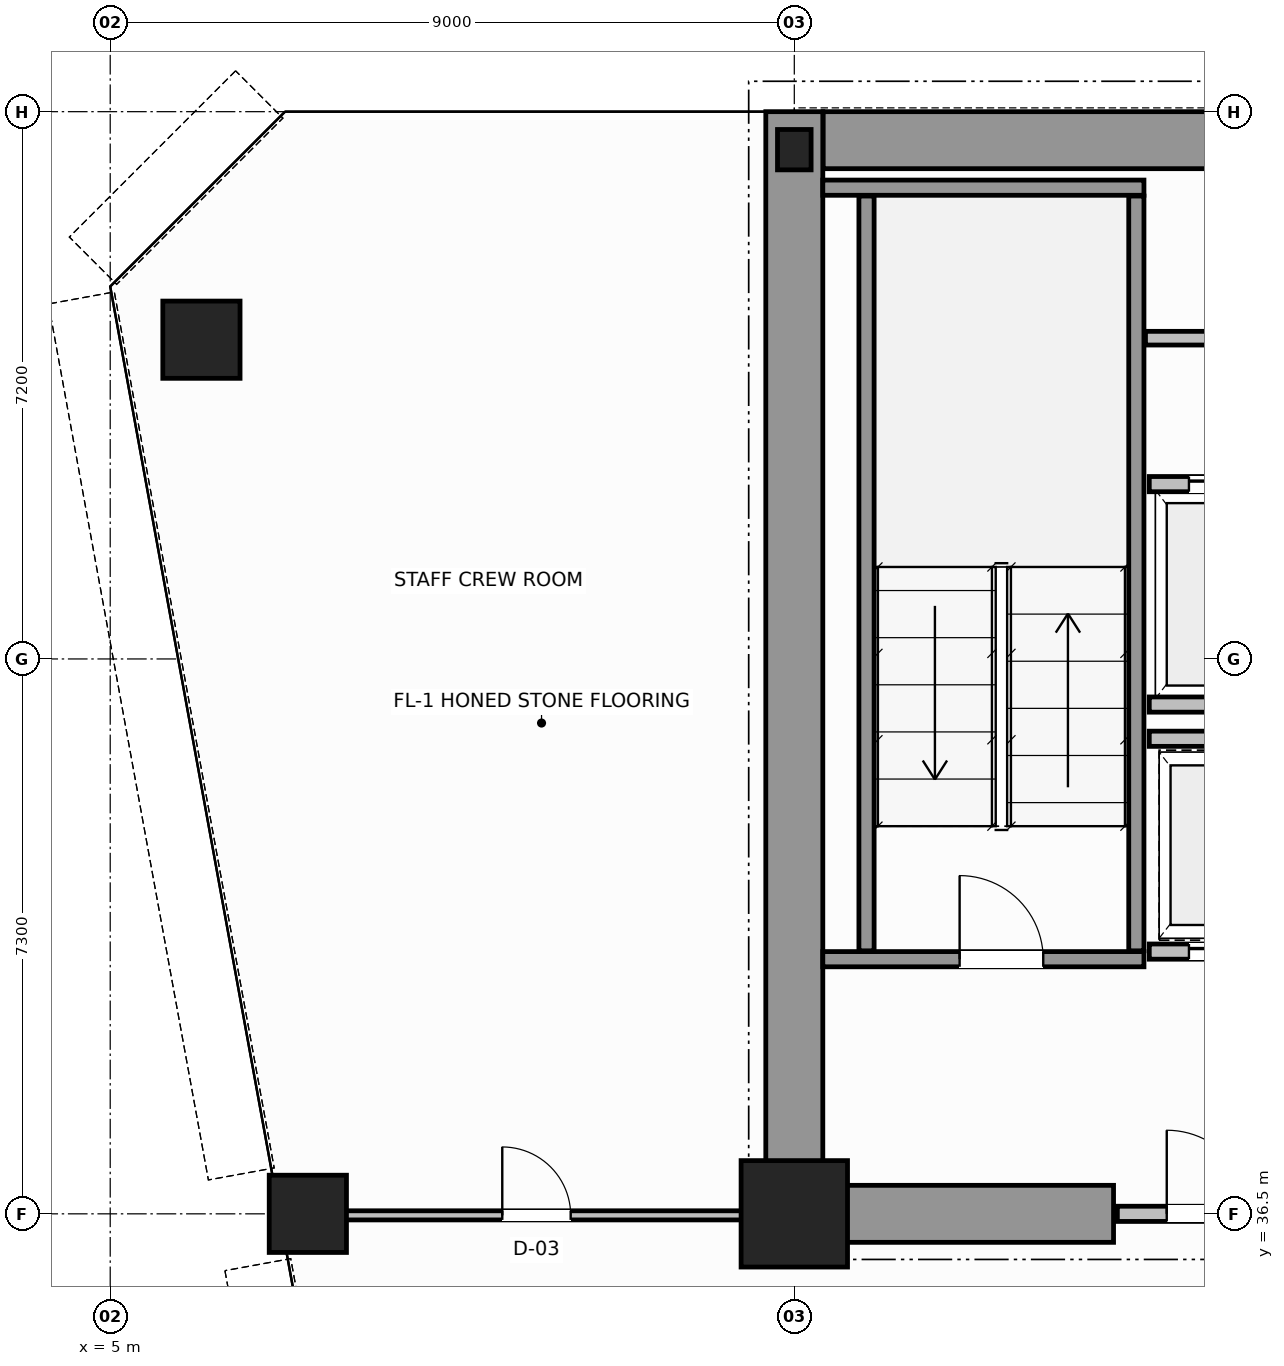
"""IFC4 building model, lengths in metres.
Left out: names, types, materials, properties, quantities, classifications, styles, units other than length and angle.
Written with IfcOpenShell. Run it as: python <this file> out.ifc"""

import sys

from ifc_helpers import new_model, si_unit, direction, frame, frame_2d, origin, origin_2d, place, context, subcontext, project, spatial, rectangle, hollow_circle, i_section, extrude, source, transform, mapped, element, fill, save


model = new_model("IFC4")
c1 = context("Model", 3, precision=1e-05, world=origin(), true_north=direction((0.0, 1.0)))
c2 = subcontext(c1, "Body", "Model", "MODEL_VIEW")
j1 = project(units=[si_unit("LENGTHUNIT", "METRE"), si_unit("PLANEANGLEUNIT", "RADIAN")], contexts=[c1])
p1 = place(None, origin())
s1 = spatial("IfcSite", under=j1, at=p1, CompositionType="ELEMENT")
p2 = place(p1, origin())
s2 = spatial("IfcBuilding", under=s1, at=p2, CompositionType="ELEMENT")
p3 = place(p2, frame((0.0, 0.0, 95.8)))
s3 = spatial("IfcBuildingStorey", under=s2, at=p3, CompositionType="ELEMENT", Elevation=95.8)
m1 = source(origin(), c2, "Body", "SweptSolid", [
    extrude(rectangle(XDim=1.4, YDim=1.4, at=origin_2d()), origin(), (0.0, 0.0, 1.0), 3.8),
])
p4 = place(p3, frame((14.0, 36.5, 0.0), z_axis=(0.0, 0.0, 1.0), x_axis=(1.0, 0.0, 0.0)))
e1 = element("IfcColumn", 1, at=p4, inside=s3, PredefinedType="COLUMN", context=c2, shape_type="MappedRepresentation", body=[
    mapped(m1, transform((0.0, 0.0, 0.0), scale=1.0)),
])
m2 = source(origin(), c2, "Body", "SweptSolid", [
    extrude(i_section(OverallWidth=0.442, OverallDepth=0.531, WebThickness=0.065, FlangeThickness=0.076, FilletRadius=0.015, at=origin_2d()), origin(), (0.0, 0.0, 1.0), 3.8),
])
p5 = place(p3, frame((14.0, 50.5, 0.0), z_axis=(0.0, 0.0, 1.0), x_axis=(1.0, 0.0, 0.0)))
e2 = element("IfcColumn", 2, at=p5, inside=s3, PredefinedType="COLUMN", context=c2, shape_type="MappedRepresentation", body=[
    mapped(m2, transform((0.0, 0.0, 0.0), scale=1.0)),
])
m3 = source(origin(), c2, "Body", "SweptSolid", [
    extrude(hollow_circle(Radius=0.508, WallThickness=0.045, at=origin_2d()), origin(), (0.0, 0.0, 1.0), 3.8),
])
for number, where, z_axis, x_axis in (
    (3, (6.2, 48.0, 0.0), (0.0, 0.0, 1.0), (1.0, 0.0, 0.0)),
    (4, (7.6, 36.5, 0.0), (0.0, 0.0, 1.0), (1.0, 0.0, 0.0)),
):
    element("IfcColumn", number, at=place(p3, frame(where, z_axis=z_axis, x_axis=x_axis)), inside=s3, PredefinedType="COLUMN", context=c2, shape_type="MappedRepresentation", body=[
        mapped(m3, transform((0.0, 0.0, 0.0), scale=1.0)),
    ])
p6 = place(p3, frame((14.379, 50.625, 0.0), z_axis=(0.0, 0.0, 1.0), x_axis=(1.0, 0.0, 0.0)))
e5 = element("IfcWall", 5, at=p6, inside=s3, PredefinedType="SHEAR", context=c2, shape_type="SweptSolid", body=[
    extrude(rectangle(XDim=19.619, YDim=0.75, at=frame_2d((9.81, 0.0))), origin(), (0.0, 0.0, 1.0), 3.8),
])
p7 = place(p3, frame((14.0, 36.5, 0.0), z_axis=(0.0, 0.0, 1.0), x_axis=(0.0, 1.0, 0.0)))
e6 = element("IfcWall", 6, at=p7, inside=s3, PredefinedType="SHEAR", context=c2, shape_type="SweptSolid", body=[
    extrude(rectangle(XDim=14.5, YDim=0.75, at=frame_2d((7.25, 0.0))), origin(), (0.0, 0.0, 1.0), 3.8),
])
p8 = place(p3, frame((14.395, 36.5, 0.0), z_axis=(0.0, 0.0, 1.0), x_axis=(1.0, 0.0, 0.0)))
e7 = element("IfcWall", 7, at=p8, inside=s3, PredefinedType="SHEAR", context=c2, shape_type="SweptSolid", body=[
    extrude(rectangle(XDim=3.805, YDim=0.75, at=frame_2d((1.902, 0.0))), origin(), (0.0, 0.0, 1.0), 2.38),
])
p9 = place(p3, frame((14.375, 39.85, 0.0), z_axis=(0.0, 0.0, 1.0), x_axis=(1.0, 0.0, 0.0)))
e8 = element("IfcWall", 8, at=p9, inside=s3, PredefinedType="SOLIDWALL", context=c2, shape_type="SweptSolid", body=[
    extrude(rectangle(XDim=4.225, YDim=0.2, at=frame_2d((2.113, 0.0))), origin(), (0.0, 0.0, 1.0), 3.8),
])
p10 = place(p9, frame((1.8, 0.0, 0.0)))
e9 = element("IfcOpeningElement", 9, at=p10, cuts=e8, PredefinedType="OPENING", context=c2, shape_type="SweptSolid", body=[
    extrude(rectangle(XDim=1.1, YDim=2.15, at=frame_2d((0.55, 1.075))), frame((0.0, 0.11, 0.0), z_axis=(0.0, -1.0, 0.0), x_axis=(1.0, 0.0, 0.0)), (0.0, 0.0, 1.0), 0.22),
])
p11 = place(p3, frame((14.375, 50.0, 0.0), z_axis=(0.0, 0.0, 1.0), x_axis=(1.0, 0.0, 0.0)))
e10 = element("IfcWall", 10, at=p11, inside=s3, PredefinedType="SOLIDWALL", context=c2, shape_type="SweptSolid", body=[
    extrude(rectangle(XDim=4.225, YDim=0.2, at=frame_2d((2.113, 0.0))), origin(), (0.0, 0.0, 1.0), 3.8),
])
for number, where, z_axis, x_axis in (
    (11, (14.95, 39.96, 0.0), (0.0, 0.0, 1.0), (0.0, 1.0, 0.0)),
    (12, (18.5, 39.96, 0.0), (0.0, 0.0, 1.0), (0.0, 1.0, 0.0)),
):
    element("IfcWall", number, at=place(p3, frame(where, z_axis=z_axis, x_axis=x_axis)), inside=s3, PredefinedType="SOLIDWALL", context=c2, shape_type="SweptSolid", body=[
        extrude(rectangle(XDim=9.93, YDim=0.2, at=frame_2d((4.965, 0.0))), origin(), (0.0, 0.0, 1.0), 3.8),
    ])
p12 = place(p3, frame((18.25, 36.5, 0.0), z_axis=(0.0, 0.0, 1.0), x_axis=(1.0, 0.0, 0.0)))
e13 = element("IfcWall", 13, at=p12, inside=s3, PredefinedType="SOLIDWALL", context=c2, shape_type="SweptSolid", body=[
    extrude(rectangle(XDim=2.47, YDim=0.2, at=frame_2d((1.235, 0.0))), origin(), (0.0, 0.0, 1.0), 2.37),
])
p13 = place(p12, frame((0.65, 0.0, 0.0)))
e14 = element("IfcOpeningElement", 14, at=p13, cuts=e13, PredefinedType="OPENING", context=c2, shape_type="SweptSolid", body=[
    extrude(rectangle(XDim=1.1, YDim=2.15, at=frame_2d((0.55, 1.075))), frame((0.0, 0.11, 0.0), z_axis=(0.0, -1.0, 0.0), x_axis=(1.0, 0.0, 0.0)), (0.0, 0.0, 1.0), 0.22),
])
p14 = place(p3, frame((18.67, 46.1, 0.0), z_axis=(0.0, 0.0, 1.0), x_axis=(1.0, 0.0, 0.0)))
e15 = element("IfcWall", 15, at=p14, inside=s3, PredefinedType="SOLIDWALL", context=c2, shape_type="SweptSolid", body=[
    extrude(rectangle(XDim=2.145, YDim=0.2, at=frame_2d((1.073, 0.0))), origin(), (0.0, 0.0, 1.0), 3.58),
])
p15 = place(p14, frame((0.522, 0.0, 0.0)))
e16 = element("IfcOpeningElement", 16, at=p15, cuts=e15, PredefinedType="OPENING", context=c2, shape_type="SweptSolid", body=[
    extrude(rectangle(XDim=1.1, YDim=2.15, at=frame_2d((0.55, 1.075))), frame((0.0, 0.11, 0.0), z_axis=(0.0, -1.0, 0.0), x_axis=(1.0, 0.0, 0.0)), (0.0, 0.0, 1.0), 0.22),
])
p16 = place(p3, frame((18.67, 43.2, 0.0), z_axis=(0.0, 0.0, 1.0), x_axis=(1.0, 0.0, 0.0)))
e17 = element("IfcWall", 17, at=p16, inside=s3, PredefinedType="SOLIDWALL", context=c2, shape_type="SweptSolid", body=[
    extrude(rectangle(XDim=2.145, YDim=0.2, at=frame_2d((1.073, 0.0))), origin(), (0.0, 0.0, 1.0), 3.58),
])
p17 = place(p3, frame((18.67, 39.95, 0.0), z_axis=(0.0, 0.0, 1.0), x_axis=(1.0, 0.0, 0.0)))
e18 = element("IfcWall", 18, at=p17, inside=s3, PredefinedType="SOLIDWALL", context=c2, shape_type="SweptSolid", body=[
    extrude(rectangle(XDim=2.145, YDim=0.2, at=frame_2d((1.073, 0.0))), origin(), (0.0, 0.0, 1.0), 3.58),
])
p18 = place(p17, frame((0.522, 0.0, 0.0)))
e19 = element("IfcOpeningElement", 19, at=p18, cuts=e18, PredefinedType="OPENING", context=c2, shape_type="SweptSolid", body=[
    extrude(rectangle(XDim=1.1, YDim=2.15, at=frame_2d((0.55, 1.075))), frame((0.0, 0.11, 0.0), z_axis=(0.0, -1.0, 0.0), x_axis=(1.0, 0.0, 0.0)), (0.0, 0.0, 1.0), 0.22),
])
p19 = place(p3, frame((18.67, 42.75, 0.0), z_axis=(0.0, 0.0, 1.0), x_axis=(1.0, 0.0, 0.0)))
e20 = element("IfcWall", 20, at=p19, inside=s3, PredefinedType="SOLIDWALL", context=c2, shape_type="SweptSolid", body=[
    extrude(rectangle(XDim=2.145, YDim=0.2, at=frame_2d((1.073, 0.0))), origin(), (0.0, 0.0, 1.0), 3.58),
])
p20 = place(p3, frame((18.62, 48.02, 0.0), z_axis=(0.0, 0.0, 1.0), x_axis=(1.0, 0.0, 0.0)))
e21 = element("IfcWall", 21, at=p20, inside=s3, PredefinedType="PLUMBINGWALL", context=c2, shape_type="SweptSolid", body=[
    extrude(rectangle(XDim=30.76, YDim=0.18, at=frame_2d((15.38, 0.0))), origin(), (0.0, 0.0, 1.0), 3.58),
])
p21 = place(p20, frame((1.655, 0.0, 0.0)))
e22 = element("IfcOpeningElement", 22, at=p21, cuts=e21, PredefinedType="OPENING", context=c2, shape_type="SweptSolid", body=[
    extrude(rectangle(XDim=0.9, YDim=2.15, at=frame_2d((0.45, 1.075))), frame((0.0, 0.1, 0.0), z_axis=(0.0, -1.0, 0.0), x_axis=(1.0, 0.0, 0.0)), (0.0, 0.0, 1.0), 0.2),
])
p22 = place(p20, frame((6.03, 0.0, 0.0)))
e23 = element("IfcOpeningElement", 23, at=p22, cuts=e21, PredefinedType="OPENING", context=c2, shape_type="SweptSolid", body=[
    extrude(rectangle(XDim=0.9, YDim=2.15, at=frame_2d((0.45, 1.075))), frame((0.0, 0.1, 0.0), z_axis=(0.0, -1.0, 0.0), x_axis=(1.0, 0.0, 0.0)), (0.0, 0.0, 1.0), 0.2),
])
p23 = place(p20, frame((10.93, 0.0, 0.0)))
e24 = element("IfcOpeningElement", 24, at=p23, cuts=e21, PredefinedType="OPENING", context=c2, shape_type="SweptSolid", body=[
    extrude(rectangle(XDim=0.9, YDim=2.15, at=frame_2d((0.45, 1.075))), frame((0.0, 0.1, 0.0), z_axis=(0.0, -1.0, 0.0), x_axis=(1.0, 0.0, 0.0)), (0.0, 0.0, 1.0), 0.2),
])
p24 = place(p20, frame((16.13, 0.0, 0.0)))
e25 = element("IfcOpeningElement", 25, at=p24, cuts=e21, PredefinedType="OPENING", context=c2, shape_type="SweptSolid", body=[
    extrude(rectangle(XDim=0.9, YDim=2.15, at=frame_2d((0.45, 1.075))), frame((0.0, 0.1, 0.0), z_axis=(0.0, -1.0, 0.0), x_axis=(1.0, 0.0, 0.0)), (0.0, 0.0, 1.0), 0.2),
])
p25 = place(p20, frame((21.73, 0.0, 0.0)))
e26 = element("IfcOpeningElement", 26, at=p25, cuts=e21, PredefinedType="OPENING", context=c2, shape_type="SweptSolid", body=[
    extrude(rectangle(XDim=0.9, YDim=2.15, at=frame_2d((0.45, 1.075))), frame((0.0, 0.1, 0.0), z_axis=(0.0, -1.0, 0.0), x_axis=(1.0, 0.0, 0.0)), (0.0, 0.0, 1.0), 0.2),
])
p26 = place(p20, frame((27.505, 0.0, 0.0)))
e27 = element("IfcOpeningElement", 27, at=p26, cuts=e21, PredefinedType="OPENING", context=c2, shape_type="SweptSolid", body=[
    extrude(rectangle(XDim=0.9, YDim=2.15, at=frame_2d((0.45, 1.075))), frame((0.0, 0.1, 0.0), z_axis=(0.0, -1.0, 0.0), x_axis=(1.0, 0.0, 0.0)), (0.0, 0.0, 1.0), 0.2),
])
p27 = place(p3, frame((7.276, 36.48, 0.0), z_axis=(0.0, 0.0, 1.0), x_axis=(1.0, 0.0, 0.0)))
e28 = element("IfcWall", 28, at=p27, inside=s3, PredefinedType="PARTITIONING", context=c2, shape_type="SweptSolid", body=[
    extrude(rectangle(XDim=6.664, YDim=0.12, at=frame_2d((3.332, 0.0))), origin(), (0.0, 0.0, 1.0), 2.87),
])
p28 = place(p27, frame((2.882, 0.0, 0.0)))
e29 = element("IfcOpeningElement", 29, at=p28, cuts=e28, PredefinedType="OPENING", context=c2, shape_type="SweptSolid", body=[
    extrude(rectangle(XDim=0.9, YDim=2.15, at=frame_2d((0.45, 1.075))), frame((0.0, 0.07, 0.0), z_axis=(0.0, -1.0, 0.0), x_axis=(1.0, 0.0, 0.0)), (0.0, 0.0, 1.0), 0.14),
])
m4 = source(origin(), c2, "Body", "SweptSolid", [
    extrude(rectangle(XDim=1.1, YDim=2.15, at=frame_2d((0.55, 1.075))), frame((0.0, 0.025, 0.0), z_axis=(0.0, -1.0, 0.0), x_axis=(1.0, 0.0, 0.0)), (0.0, 0.0, 1.0), 0.05),
])
p29 = place(p10, origin())
e30 = element("IfcDoor", 30, at=p29, inside=s3, OperationType="SINGLE_SWING_LEFT", PredefinedType="DOOR", context=c2, shape_type="MappedRepresentation", body=[
    mapped(m4, transform((0.0, 0.0, 0.0), scale=1.0)),
])
fill(e9, e30)
p30 = place(p13, origin())
e31 = element("IfcDoor", 31, at=p30, inside=s3, OperationType="SINGLE_SWING_RIGHT", PredefinedType="DOOR", context=c2, shape_type="MappedRepresentation", body=[
    mapped(m4, transform((0.0, 0.0, 0.0), scale=1.0)),
])
fill(e14, e31)
p31 = place(p15, origin())
e32 = element("IfcDoor", 32, at=p31, inside=s3, OperationType="DOUBLE_DOOR_SLIDING", PredefinedType="DOOR", context=c2, shape_type="MappedRepresentation", body=[
    mapped(m4, transform((0.0, 0.0, 0.0), scale=1.0)),
])
fill(e16, e32)
p32 = place(p18, origin())
e33 = element("IfcDoor", 33, at=p32, inside=s3, OperationType="DOUBLE_DOOR_SLIDING", PredefinedType="DOOR", context=c2, shape_type="MappedRepresentation", body=[
    mapped(m4, transform((0.0, 0.0, 0.0), scale=1.0)),
])
fill(e19, e33)
m5 = source(origin(), c2, "Body", "SweptSolid", [
    extrude(rectangle(XDim=0.9, YDim=2.15, at=frame_2d((0.45, 1.075))), frame((0.0, 0.025, 0.0), z_axis=(0.0, -1.0, 0.0), x_axis=(1.0, 0.0, 0.0)), (0.0, 0.0, 1.0), 0.05),
])
p33 = place(p28, origin())
e34 = element("IfcDoor", 34, at=p33, inside=s3, OperationType="SINGLE_SWING_LEFT", PredefinedType="DOOR", context=c2, shape_type="MappedRepresentation", body=[
    mapped(m5, transform((0.0, 0.0, 0.0), scale=1.0)),
])
fill(e29, e34)
save(model, sys.argv[1])
